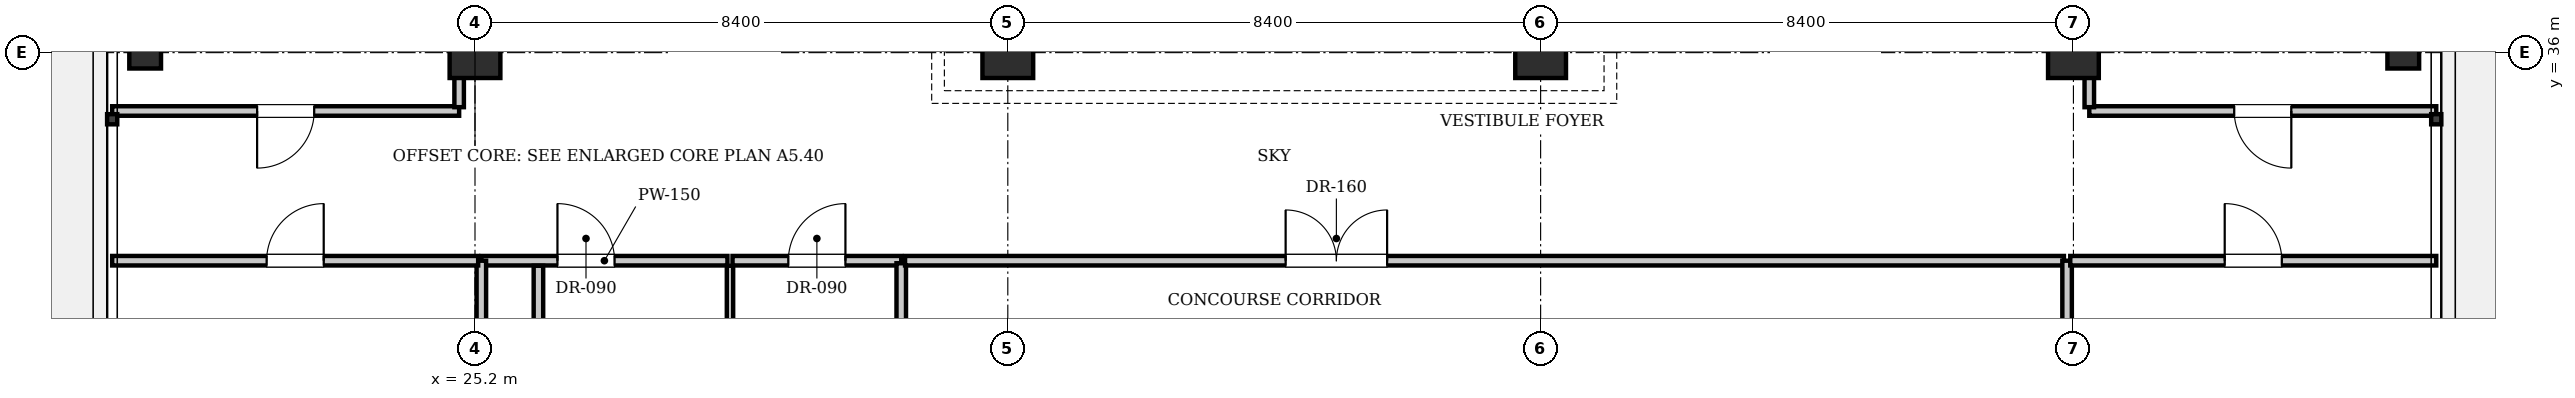
"""IFC4 building model, lengths in metres.
Left out: names, types, materials, properties, quantities, classifications, styles, units other than length and angle.
Written with IfcOpenShell. Run it as: python <this file> out.ifc"""

import sys

from ifc_helpers import new_model, si_unit, direction, frame, frame_2d, origin, origin_2d, place, context, subcontext, project, spatial, rectangle, i_section, extrude, element, fill, save


model = new_model("IFC4")
c1 = context("Model", 3, precision=1e-05, world=origin(), true_north=direction((0.0, 1.0)))
c2 = subcontext(c1, "Body", "Model", "MODEL_VIEW")
j1 = project(units=[si_unit("LENGTHUNIT", "METRE"), si_unit("PLANEANGLEUNIT", "RADIAN")], contexts=[c1])
p1 = place(None, origin())
s1 = spatial("IfcSite", under=j1, at=p1, CompositionType="ELEMENT")
p2 = place(p1, origin())
s2 = spatial("IfcBuilding", under=s1, at=p2, CompositionType="ELEMENT")
p3 = place(p2, frame((0.0, 0.0, 354.2)))
s3 = spatial("IfcBuildingStorey", under=s2, at=p3, CompositionType="ELEMENT", Elevation=354.2)
for number, where, z_axis, x_axis in (
    (1, (25.2, 36.0, 0.0), (0.0, 0.0, 1.0), (1.0, 0.0, 0.0)),
    (2, (33.6, 36.0, 0.0), (0.0, 0.0, 1.0), (1.0, 0.0, 0.0)),
    (3, (42.0, 36.0, 0.0), (0.0, 0.0, 1.0), (1.0, 0.0, 0.0)),
    (4, (50.4, 36.0, 0.0), (0.0, 0.0, 1.0), (1.0, 0.0, 0.0)),
):
    element("IfcColumn", number, at=place(p3, frame(where, z_axis=z_axis, x_axis=x_axis)), inside=s3, PredefinedType="COLUMN", context=c2, shape_type="SweptSolid", body=[
        extrude(rectangle(XDim=0.8, YDim=0.8, at=origin_2d()), origin(), (0.0, 0.0, 1.0), 4.9),
    ])
for number, where, z_axis, x_axis in (
    (5, (20.0, 36.0, -0.26), (0.0, 0.0, 1.0), (1.0, 0.0, 0.0)),
    (6, (55.6, 36.0, -0.26), (0.0, 0.0, 1.0), (1.0, 0.0, 0.0)),
):
    element("IfcColumn", number, at=place(p3, frame(where, z_axis=z_axis, x_axis=x_axis)), inside=s3, PredefinedType="COLUMN", context=c2, shape_type="SweptSolid", body=[
        extrude(i_section(OverallWidth=0.5, OverallDepth=0.5, WebThickness=0.022, FlangeThickness=0.032, at=origin_2d()), origin(), (0.0, 0.0, 1.0), 5.16),
    ])
p4 = place(p3, frame((25.3, 32.72, 0.0), z_axis=(0.0, 0.0, 1.0), x_axis=(1.0, 0.0, 0.0)))
e7 = element("IfcWall", 7, at=p4, inside=s3, PredefinedType="PARTITIONING", context=c2, shape_type="SweptSolid", body=[
    extrude(rectangle(XDim=3.88, YDim=0.15, at=frame_2d((1.94, 0.0))), origin(), (0.0, 0.0, 1.0), 4.64),
])
p5 = place(p4, frame((1.2, 0.0, 0.0)))
e8 = element("IfcOpeningElement", 8, at=p5, cuts=e7, PredefinedType="OPENING", context=c2, shape_type="SweptSolid", body=[
    extrude(rectangle(XDim=0.9, YDim=2.1, at=frame_2d((0.45, 1.05))), frame((0.0, 0.085, 0.0), z_axis=(0.0, -1.0, 0.0), x_axis=(1.0, 0.0, 0.0)), (0.0, 0.0, 1.0), 0.17),
])
p6 = place(p3, frame((29.26, 32.72, 0.0), z_axis=(0.0, 0.0, 1.0), x_axis=(1.0, 0.0, 0.0)))
e9 = element("IfcWall", 9, at=p6, inside=s3, PredefinedType="PARTITIONING", context=c2, shape_type="SweptSolid", body=[
    extrude(rectangle(XDim=2.66, YDim=0.15, at=frame_2d((1.33, 0.0))), origin(), (0.0, 0.0, 1.0), 4.64),
])
p7 = place(p6, frame((0.88, 0.0, 0.0)))
e10 = element("IfcOpeningElement", 10, at=p7, cuts=e9, PredefinedType="OPENING", context=c2, shape_type="SweptSolid", body=[
    extrude(rectangle(XDim=0.9, YDim=2.1, at=frame_2d((0.45, 1.05))), frame((0.0, 0.085, 0.0), z_axis=(0.0, -1.0, 0.0), x_axis=(1.0, 0.0, 0.0)), (0.0, 0.0, 1.0), 0.17),
])
p8 = place(p3, frame((26.2, 29.46, 0.0), z_axis=(0.0, 0.0, 1.0), x_axis=(0.0, 1.0, 0.0)))
e11 = element("IfcWall", 11, at=p8, inside=s3, PredefinedType="PARTITIONING", context=c2, shape_type="SweptSolid", body=[
    extrude(rectangle(XDim=3.18, YDim=0.15, at=frame_2d((1.59, 0.0))), origin(), (0.0, 0.0, 1.0), 4.64),
])
p9 = place(p3, frame((29.22, 29.46, 0.0), z_axis=(0.0, 0.0, 1.0), x_axis=(0.0, 1.0, 0.0)))
e12 = element("IfcWall", 12, at=p9, inside=s3, PredefinedType="PARTITIONING", context=c2, shape_type="SweptSolid", body=[
    extrude(rectangle(XDim=3.18, YDim=0.1, at=frame_2d((1.59, 0.0))), origin(), (0.0, 0.0, 1.0), 4.64),
])
p10 = place(p3, frame((31.92, 29.46, 0.0), z_axis=(0.0, 0.0, 1.0), x_axis=(0.0, 1.0, 0.0)))
e13 = element("IfcWall", 13, at=p10, inside=s3, PredefinedType="PARTITIONING", context=c2, shape_type="SweptSolid", body=[
    extrude(rectangle(XDim=3.22, YDim=0.15, at=frame_2d((1.61, 0.0))), origin(), (0.0, 0.0, 1.0), 4.64),
])
p11 = place(p3, frame((31.98, 32.72, 0.0), z_axis=(0.0, 0.0, 1.0), x_axis=(1.0, 0.0, 0.0)))
e14 = element("IfcWall", 14, at=p11, inside=s3, PredefinedType="PARTITIONING", context=c2, shape_type="SweptSolid", body=[
    extrude(rectangle(XDim=18.27, YDim=0.15, at=frame_2d((9.135, 0.0))), origin(), (0.0, 0.0, 1.0), 4.64),
])
p12 = place(p11, frame((6.0, 0.0, 0.0)))
e15 = element("IfcOpeningElement", 15, at=p12, cuts=e14, PredefinedType="OPENING", context=c2, shape_type="SweptSolid", body=[
    extrude(rectangle(XDim=1.6, YDim=2.3, at=frame_2d((0.8, 1.15))), frame((0.0, 0.085, 0.0), z_axis=(0.0, -1.0, 0.0), x_axis=(1.0, 0.0, 0.0)), (0.0, 0.0, 1.0), 0.17),
])
for number, where, z_axis, x_axis in (
    (16, (25.3, 17.28, 0.0), (0.0, 0.0, 1.0), (0.0, 1.0, 0.0)),
    (17, (50.3, 17.28, 0.0), (0.0, 0.0, 1.0), (0.0, 1.0, 0.0)),
):
    element("IfcWall", number, at=place(p3, frame(where, z_axis=z_axis, x_axis=x_axis)), inside=s3, PredefinedType="PARTITIONING", context=c2, shape_type="SweptSolid", body=[
        extrude(rectangle(XDim=15.44, YDim=0.15, at=frame_2d((7.72, 0.0))), origin(), (0.0, 0.0, 1.0), 4.177),
    ])
p13 = place(p3, frame((19.48, 32.72, 0.0), z_axis=(0.0, 0.0, 1.0), x_axis=(1.0, 0.0, 0.0)))
e18 = element("IfcWall", 18, at=p13, inside=s3, PredefinedType="PARTITIONING", context=c2, shape_type="SweptSolid", body=[
    extrude(rectangle(XDim=5.77, YDim=0.15, at=frame_2d((2.885, 0.0))), origin(), (0.0, 0.0, 1.0), 4.64),
])
p14 = place(p13, frame((2.435, 0.0, 0.0)))
e19 = element("IfcOpeningElement", 19, at=p14, cuts=e18, PredefinedType="OPENING", context=c2, shape_type="SweptSolid", body=[
    extrude(rectangle(XDim=0.9, YDim=2.1, at=frame_2d((0.45, 1.05))), frame((0.0, 0.085, 0.0), z_axis=(0.0, -1.0, 0.0), x_axis=(1.0, 0.0, 0.0)), (0.0, 0.0, 1.0), 0.17),
])
p15 = place(p3, frame((50.35, 32.72, 0.0), z_axis=(0.0, 0.0, 1.0), x_axis=(1.0, 0.0, 0.0)))
e20 = element("IfcWall", 20, at=p15, inside=s3, PredefinedType="PARTITIONING", context=c2, shape_type="SweptSolid", body=[
    extrude(rectangle(XDim=5.77, YDim=0.15, at=frame_2d((2.885, 0.0))), origin(), (0.0, 0.0, 1.0), 4.64),
])
p16 = place(p15, frame((2.435, 0.0, 0.0)))
e21 = element("IfcOpeningElement", 21, at=p16, cuts=e20, PredefinedType="OPENING", context=c2, shape_type="SweptSolid", body=[
    extrude(rectangle(XDim=0.9, YDim=2.1, at=frame_2d((0.45, 1.05))), frame((0.0, 0.085, 0.0), z_axis=(0.0, -1.0, 0.0), x_axis=(1.0, 0.0, 0.0)), (0.0, 0.0, 1.0), 0.17),
])
p17 = place(p3, frame((19.48, 35.08, 0.0), z_axis=(0.0, 0.0, 1.0), x_axis=(1.0, 0.0, 0.0)))
e22 = element("IfcWall", 22, at=p17, inside=s3, PredefinedType="PARTITIONING", context=c2, shape_type="SweptSolid", body=[
    extrude(rectangle(XDim=5.47, YDim=0.15, at=frame_2d((2.735, 0.0))), origin(), (0.0, 0.0, 1.0), 4.64),
])
p18 = place(p17, frame((2.285, 0.0, 0.0)))
e23 = element("IfcOpeningElement", 23, at=p18, cuts=e22, PredefinedType="OPENING", context=c2, shape_type="SweptSolid", body=[
    extrude(rectangle(XDim=0.9, YDim=2.1, at=frame_2d((0.45, 1.05))), frame((0.0, 0.085, 0.0), z_axis=(0.0, -1.0, 0.0), x_axis=(1.0, 0.0, 0.0)), (0.0, 0.0, 1.0), 0.17),
])
p19 = place(p3, frame((24.95, 35.14, 0.0), z_axis=(0.0, 0.0, 1.0), x_axis=(0.0, 1.0, 0.0)))
e24 = element("IfcWall", 24, at=p19, inside=s3, PredefinedType="PARTITIONING", context=c2, shape_type="SweptSolid", body=[
    extrude(rectangle(XDim=18.78, YDim=0.15, at=frame_2d((9.39, 0.0))), origin(), (0.0, 0.0, 1.0), 4.64),
])
p20 = place(p3, frame((50.65, 35.08, 0.0), z_axis=(0.0, 0.0, 1.0), x_axis=(1.0, 0.0, 0.0)))
e25 = element("IfcWall", 25, at=p20, inside=s3, PredefinedType="PARTITIONING", context=c2, shape_type="SweptSolid", body=[
    extrude(rectangle(XDim=5.47, YDim=0.15, at=frame_2d((2.735, 0.0))), origin(), (0.0, 0.0, 1.0), 4.64),
])
p21 = place(p20, frame((2.285, 0.0, 0.0)))
e26 = element("IfcOpeningElement", 26, at=p21, cuts=e25, PredefinedType="OPENING", context=c2, shape_type="SweptSolid", body=[
    extrude(rectangle(XDim=0.9, YDim=2.1, at=frame_2d((0.45, 1.05))), frame((0.0, 0.085, 0.0), z_axis=(0.0, -1.0, 0.0), x_axis=(1.0, 0.0, 0.0)), (0.0, 0.0, 1.0), 0.17),
])
p22 = place(p3, frame((50.65, 35.14, 0.0), z_axis=(0.0, 0.0, 1.0), x_axis=(0.0, 1.0, 0.0)))
e27 = element("IfcWall", 27, at=p22, inside=s3, PredefinedType="PARTITIONING", context=c2, shape_type="SweptSolid", body=[
    extrude(rectangle(XDim=18.78, YDim=0.15, at=frame_2d((9.39, 0.0))), origin(), (0.0, 0.0, 1.0), 4.64),
])
p23 = place(p5, origin())
e28 = element("IfcDoor", 28, at=p23, inside=s3, OperationType="SINGLE_SWING_LEFT", PredefinedType="DOOR", context=c2, shape_type="SweptSolid", body=[
    extrude(rectangle(XDim=0.9, YDim=2.1, at=frame_2d((0.45, 1.05))), frame((0.0, 0.025, 0.0), z_axis=(0.0, -1.0, 0.0), x_axis=(1.0, 0.0, 0.0)), (0.0, 0.0, 1.0), 0.05),
])
fill(e8, e28)
p24 = place(p7, origin())
e29 = element("IfcDoor", 29, at=p24, inside=s3, OperationType="SINGLE_SWING_RIGHT", PredefinedType="DOOR", context=c2, shape_type="SweptSolid", body=[
    extrude(rectangle(XDim=0.9, YDim=2.1, at=frame_2d((0.45, 1.05))), frame((0.0, 0.025, 0.0), z_axis=(0.0, -1.0, 0.0), x_axis=(1.0, 0.0, 0.0)), (0.0, 0.0, 1.0), 0.05),
])
fill(e10, e29)
p25 = place(p12, origin())
e30 = element("IfcDoor", 30, at=p25, inside=s3, OperationType="DOUBLE_DOOR_SINGLE_SWING", PredefinedType="DOOR", context=c2, shape_type="SweptSolid", body=[
    extrude(rectangle(XDim=1.6, YDim=2.3, at=frame_2d((0.8, 1.15))), frame((0.0, 0.025, 0.0), z_axis=(0.0, -1.0, 0.0), x_axis=(1.0, 0.0, 0.0)), (0.0, 0.0, 1.0), 0.05),
])
fill(e15, e30)
p26 = place(p14, origin())
e31 = element("IfcDoor", 31, at=p26, inside=s3, OperationType="SINGLE_SWING_RIGHT", PredefinedType="DOOR", context=c2, shape_type="SweptSolid", body=[
    extrude(rectangle(XDim=0.9, YDim=2.1, at=frame_2d((0.45, 1.05))), frame((0.0, 0.025, 0.0), z_axis=(0.0, -1.0, 0.0), x_axis=(1.0, 0.0, 0.0)), (0.0, 0.0, 1.0), 0.05),
])
fill(e19, e31)
p27 = place(p16, origin())
e32 = element("IfcDoor", 32, at=p27, inside=s3, OperationType="SINGLE_SWING_LEFT", PredefinedType="DOOR", context=c2, shape_type="SweptSolid", body=[
    extrude(rectangle(XDim=0.9, YDim=2.1, at=frame_2d((0.45, 1.05))), frame((0.0, 0.025, 0.0), z_axis=(0.0, -1.0, 0.0), x_axis=(1.0, 0.0, 0.0)), (0.0, 0.0, 1.0), 0.05),
])
fill(e21, e32)
p28 = place(p18, frame((0.9, 0.0, 0.0), z_axis=(0.0, 0.0, 1.0), x_axis=(-1.0, 0.0, 0.0)))
e33 = element("IfcDoor", 33, at=p28, inside=s3, OperationType="SINGLE_SWING_RIGHT", PredefinedType="DOOR", context=c2, shape_type="SweptSolid", body=[
    extrude(rectangle(XDim=0.9, YDim=2.1, at=frame_2d((0.45, 1.05))), frame((0.0, 0.025, 0.0), z_axis=(0.0, -1.0, 0.0), x_axis=(1.0, 0.0, 0.0)), (0.0, 0.0, 1.0), 0.05),
])
fill(e23, e33)
p29 = place(p21, frame((0.9, 0.0, 0.0), z_axis=(0.0, 0.0, 1.0), x_axis=(-1.0, 0.0, 0.0)))
e34 = element("IfcDoor", 34, at=p29, inside=s3, OperationType="SINGLE_SWING_LEFT", PredefinedType="DOOR", context=c2, shape_type="SweptSolid", body=[
    extrude(rectangle(XDim=0.9, YDim=2.1, at=frame_2d((0.45, 1.05))), frame((0.0, 0.025, 0.0), z_axis=(0.0, -1.0, 0.0), x_axis=(1.0, 0.0, 0.0)), (0.0, 0.0, 1.0), 0.05),
])
fill(e26, e34)
save(model, sys.argv[1])
